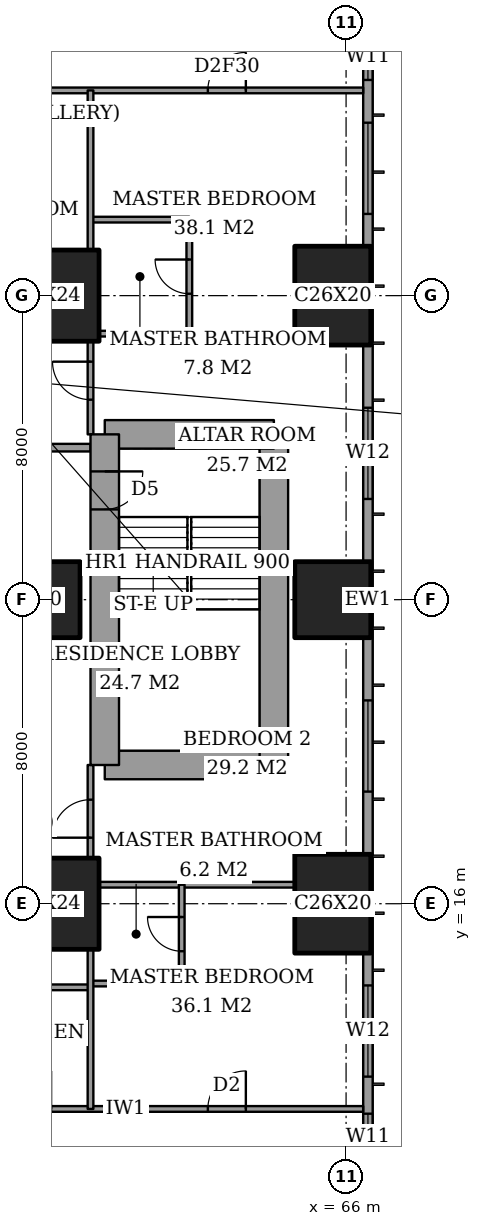
"""IFC4 building model, lengths in metres.
Left out: names, types, materials, properties, quantities, classifications, styles, units other than length and angle.
Written with IfcOpenShell. Run it as: python <this file> out.ifc"""

import sys

from ifc_helpers import new_model, si_unit, direction, frame, frame_2d, origin, origin_2d, place, context, subcontext, project, spatial, rectangle, extrude, element, fill, save


model = new_model("IFC4")
c1 = context("Model", 3, precision=1e-05, world=origin(), true_north=direction((0.0, 1.0)))
c2 = subcontext(c1, "Body", "Model", "MODEL_VIEW")
j1 = project(units=[si_unit("LENGTHUNIT", "METRE"), si_unit("PLANEANGLEUNIT", "RADIAN")], contexts=[c1])
p1 = place(None, origin())
s1 = spatial("IfcSite", under=j1, at=p1, CompositionType="ELEMENT")
p2 = place(p1, origin())
s2 = spatial("IfcBuilding", under=s1, at=p2, CompositionType="ELEMENT")
p3 = place(p2, frame((0.0, 0.0, 103.4)))
s3 = spatial("IfcBuildingStorey", under=s2, at=p3, CompositionType="ELEMENT", Elevation=103.4)
p4 = place(p3, frame((58.0, 16.0, 0.0), z_axis=(0.0, 0.0, 1.0), x_axis=(1.0, 0.0, 0.0)))
e1 = element("IfcColumn", 1, at=p4, inside=s3, PredefinedType="COLUMN", context=c2, shape_type="SweptSolid", body=[
    extrude(rectangle(XDim=3.0, YDim=2.4, at=origin_2d()), origin(), (0.0, 0.0, 1.0), 3.6),
])
p5 = place(p3, frame((58.0, 24.0, 0.0), z_axis=(0.0, 0.0, 1.0), x_axis=(1.0, 0.0, 0.0)))
e2 = element("IfcColumn", 2, at=p5, inside=s3, PredefinedType="COLUMN", context=c2, shape_type="SweptSolid", body=[
    extrude(rectangle(XDim=2.0, YDim=2.0, at=origin_2d()), origin(), (0.0, 0.0, 1.0), 3.6),
])
p6 = place(p3, frame((58.0, 32.0, 0.0), z_axis=(0.0, 0.0, 1.0), x_axis=(1.0, 0.0, 0.0)))
e3 = element("IfcColumn", 3, at=p6, inside=s3, PredefinedType="COLUMN", context=c2, shape_type="SweptSolid", body=[
    extrude(rectangle(XDim=3.0, YDim=2.4, at=origin_2d()), origin(), (0.0, 0.0, 1.0), 3.6),
])
p7 = place(p3, frame((65.65, 16.0, 0.0), z_axis=(0.0, 0.0, 1.0), x_axis=(0.0, 1.0, 0.0)))
e4 = element("IfcColumn", 4, at=p7, inside=s3, PredefinedType="COLUMN", context=c2, shape_type="SweptSolid", body=[
    extrude(rectangle(XDim=2.6, YDim=2.0, at=origin_2d()), origin(), (0.0, 0.0, 1.0), 3.6),
])
p8 = place(p3, frame((65.65, 24.0, 0.0), z_axis=(0.0, 0.0, 1.0), x_axis=(1.0, 0.0, 0.0)))
e5 = element("IfcColumn", 5, at=p8, inside=s3, PredefinedType="COLUMN", context=c2, shape_type="SweptSolid", body=[
    extrude(rectangle(XDim=2.0, YDim=2.0, at=origin_2d()), origin(), (0.0, 0.0, 1.0), 3.6),
])
p9 = place(p3, frame((65.65, 32.0, 0.0), z_axis=(0.0, 0.0, 1.0), x_axis=(0.0, 1.0, 0.0)))
e6 = element("IfcColumn", 6, at=p9, inside=s3, PredefinedType="COLUMN", context=c2, shape_type="SweptSolid", body=[
    extrude(rectangle(XDim=2.6, YDim=2.0, at=origin_2d()), origin(), (0.0, 0.0, 1.0), 3.6),
])
p10 = place(p3, frame((59.65, 19.65, 0.0), z_axis=(0.0, 0.0, 1.0), x_axis=(1.0, 0.0, 0.0)))
e7 = element("IfcWall", 7, at=p10, inside=s3, PredefinedType="SHEAR", context=c2, shape_type="SweptSolid", body=[
    extrude(rectangle(XDim=4.45, YDim=0.75, at=frame_2d((2.225, 0.0))), origin(), (0.0, 0.0, 1.0), 3.6),
])
p11 = place(p3, frame((64.1, 19.65, 0.0), z_axis=(0.0, 0.0, 1.0), x_axis=(0.0, 1.0, 0.0)))
e8 = element("IfcWall", 8, at=p11, inside=s3, PredefinedType="SHEAR", context=c2, shape_type="SweptSolid", body=[
    extrude(rectangle(XDim=8.7, YDim=0.75, at=frame_2d((4.35, 0.0))), origin(), (0.0, 0.0, 1.0), 3.6),
])
p12 = place(p3, frame((64.1, 28.35, 0.0), z_axis=(0.0, 0.0, 1.0), x_axis=(-1.0, 0.0, 0.0)))
e9 = element("IfcWall", 9, at=p12, inside=s3, PredefinedType="SHEAR", context=c2, shape_type="SweptSolid", body=[
    extrude(rectangle(XDim=4.45, YDim=0.75, at=frame_2d((2.225, 0.0))), origin(), (0.0, 0.0, 1.0), 3.6),
])
p13 = place(p3, frame((59.65, 28.35, 0.0), z_axis=(0.0, 0.0, 1.0), x_axis=(0.0, -1.0, 0.0)))
e10 = element("IfcWall", 10, at=p13, inside=s3, PredefinedType="SHEAR", context=c2, shape_type="SweptSolid", body=[
    extrude(rectangle(XDim=8.7, YDim=0.75, at=frame_2d((4.35, 0.0))), origin(), (0.0, 0.0, 1.0), 3.6),
])
p14 = place(p13, frame((0.975, 0.0, 0.0)))
e11 = element("IfcOpeningElement", 11, at=p14, cuts=e10, PredefinedType="OPENING", context=c2, shape_type="SweptSolid", body=[
    extrude(rectangle(XDim=1.0, YDim=2.1, at=frame_2d((0.5, 1.05))), frame((0.0, 0.385, 0.0), z_axis=(0.0, -1.0, 0.0), x_axis=(1.0, 0.0, 0.0)), (0.0, 0.0, 1.0), 0.77),
])
p15 = place(p3, frame((66.575, 3.175, 0.0), z_axis=(0.0, 0.0, 1.0), x_axis=(0.0, 1.0, 0.0)))
e12 = element("IfcWall", 12, at=p15, inside=s3, PredefinedType="SOLIDWALL", context=c2, shape_type="SweptSolid", body=[
    extrude(rectangle(XDim=41.65, YDim=0.25, at=frame_2d((20.825, 0.0))), origin(), (0.0, 0.0, 1.0), 3.6),
])
p16 = place(p15, frame((0.775, 0.0, 0.4)))
e13 = element("IfcOpeningElement", 13, at=p16, cuts=e12, PredefinedType="OPENING", context=c2, shape_type="SweptSolid", body=[
    extrude(rectangle(XDim=2.4, YDim=2.2, at=frame_2d((1.2, 1.1))), frame((0.0, 0.135, 0.0), z_axis=(0.0, -1.0, 0.0), x_axis=(1.0, 0.0, 0.0)), (0.0, 0.0, 1.0), 0.27),
])
p17 = place(p15, frame((6.1, 0.0, 0.4)))
e14 = element("IfcOpeningElement", 14, at=p17, cuts=e12, PredefinedType="OPENING", context=c2, shape_type="SweptSolid", body=[
    extrude(rectangle(XDim=1.2, YDim=2.2, at=frame_2d((0.6, 1.1))), frame((0.0, 0.135, 0.0), z_axis=(0.0, -1.0, 0.0), x_axis=(1.0, 0.0, 0.0)), (0.0, 0.0, 1.0), 0.27),
])
p18 = place(p15, frame((8.275, 0.0, 0.4)))
e15 = element("IfcOpeningElement", 15, at=p18, cuts=e12, PredefinedType="OPENING", context=c2, shape_type="SweptSolid", body=[
    extrude(rectangle(XDim=2.4, YDim=2.2, at=frame_2d((1.2, 1.1))), frame((0.0, 0.135, 0.0), z_axis=(0.0, -1.0, 0.0), x_axis=(1.0, 0.0, 0.0)), (0.0, 0.0, 1.0), 0.27),
])
p19 = place(p15, frame((15.775, 0.0, 0.4)))
e16 = element("IfcOpeningElement", 16, at=p19, cuts=e12, PredefinedType="OPENING", context=c2, shape_type="SweptSolid", body=[
    extrude(rectangle(XDim=2.4, YDim=2.2, at=frame_2d((1.2, 1.1))), frame((0.0, 0.135, 0.0), z_axis=(0.0, -1.0, 0.0), x_axis=(1.0, 0.0, 0.0)), (0.0, 0.0, 1.0), 0.27),
])
p20 = place(p15, frame((23.475, 0.0, 0.4)))
e17 = element("IfcOpeningElement", 17, at=p20, cuts=e12, PredefinedType="OPENING", context=c2, shape_type="SweptSolid", body=[
    extrude(rectangle(XDim=2.4, YDim=2.2, at=frame_2d((1.2, 1.1))), frame((0.0, 0.135, 0.0), z_axis=(0.0, -1.0, 0.0), x_axis=(1.0, 0.0, 0.0)), (0.0, 0.0, 1.0), 0.27),
])
p21 = place(p15, frame((30.975, 0.0, 0.4)))
e18 = element("IfcOpeningElement", 18, at=p21, cuts=e12, PredefinedType="OPENING", context=c2, shape_type="SweptSolid", body=[
    extrude(rectangle(XDim=2.4, YDim=2.2, at=frame_2d((1.2, 1.1))), frame((0.0, 0.135, 0.0), z_axis=(0.0, -1.0, 0.0), x_axis=(1.0, 0.0, 0.0)), (0.0, 0.0, 1.0), 0.27),
])
p22 = place(p15, frame((34.5, 0.0, 0.4)))
e19 = element("IfcOpeningElement", 19, at=p22, cuts=e12, PredefinedType="OPENING", context=c2, shape_type="SweptSolid", body=[
    extrude(rectangle(XDim=1.2, YDim=2.2, at=frame_2d((0.6, 1.1))), frame((0.0, 0.135, 0.0), z_axis=(0.0, -1.0, 0.0), x_axis=(1.0, 0.0, 0.0)), (0.0, 0.0, 1.0), 0.27),
])
p23 = place(p15, frame((38.475, 0.0, 0.4)))
e20 = element("IfcOpeningElement", 20, at=p23, cuts=e12, PredefinedType="OPENING", context=c2, shape_type="SweptSolid", body=[
    extrude(rectangle(XDim=2.4, YDim=2.2, at=frame_2d((1.2, 1.1))), frame((0.0, 0.135, 0.0), z_axis=(0.0, -1.0, 0.0), x_axis=(1.0, 0.0, 0.0)), (0.0, 0.0, 1.0), 0.27),
])
p24 = place(p3, frame((41.439, 10.6, 0.0), z_axis=(0.0, 0.0, 1.0), x_axis=(1.0, 0.0, 0.0)))
e21 = element("IfcWall", 21, at=p24, inside=s3, PredefinedType="PARTITIONING", context=c2, shape_type="SweptSolid", body=[
    extrude(rectangle(XDim=25.011, YDim=0.15, at=frame_2d((12.505, 0.0))), origin(), (0.0, 0.0, 1.0), 3.35),
])
p25 = place(p24, frame((10.761, 0.0, 0.0)))
e22 = element("IfcOpeningElement", 22, at=p25, cuts=e21, PredefinedType="OPENING", context=c2, shape_type="SweptSolid", body=[
    extrude(rectangle(XDim=1.0, YDim=2.1, at=frame_2d((0.5, 1.05))), frame((0.0, 0.085, 0.0), z_axis=(0.0, -1.0, 0.0), x_axis=(1.0, 0.0, 0.0)), (0.0, 0.0, 1.0), 0.17),
])
p26 = place(p24, frame((20.924, 0.0, 0.0)))
e23 = element("IfcOpeningElement", 23, at=p26, cuts=e21, PredefinedType="OPENING", context=c2, shape_type="SweptSolid", body=[
    extrude(rectangle(XDim=1.0, YDim=2.1, at=frame_2d((0.5, 1.05))), frame((0.0, 0.085, 0.0), z_axis=(0.0, -1.0, 0.0), x_axis=(1.0, 0.0, 0.0)), (0.0, 0.0, 1.0), 0.17),
])
p27 = place(p24, frame((15.799, 0.0, 0.0)))
e24 = element("IfcOpeningElement", 24, at=p27, cuts=e21, PredefinedType="OPENING", context=c2, shape_type="SweptSolid", body=[
    extrude(rectangle(XDim=1.0, YDim=2.1, at=frame_2d((0.5, 1.05))), frame((0.0, 0.085, 0.0), z_axis=(0.0, -1.0, 0.0), x_axis=(1.0, 0.0, 0.0)), (0.0, 0.0, 1.0), 0.17),
])
p28 = place(p24, frame((13.061, 0.0, 0.0)))
e25 = element("IfcOpeningElement", 25, at=p28, cuts=e21, PredefinedType="OPENING", context=c2, shape_type="SweptSolid", body=[
    extrude(rectangle(XDim=1.0, YDim=2.1, at=frame_2d((0.5, 1.05))), frame((0.0, 0.085, 0.0), z_axis=(0.0, -1.0, 0.0), x_axis=(1.0, 0.0, 0.0)), (0.0, 0.0, 1.0), 0.17),
])
p29 = place(p24, frame((7.911, 0.0, 0.0)))
e26 = element("IfcOpeningElement", 26, at=p29, cuts=e21, PredefinedType="OPENING", context=c2, shape_type="SweptSolid", body=[
    extrude(rectangle(XDim=0.9, YDim=2.1, at=frame_2d((0.45, 1.05))), frame((0.0, 0.085, 0.0), z_axis=(0.0, -1.0, 0.0), x_axis=(1.0, 0.0, 0.0)), (0.0, 0.0, 1.0), 0.17),
])
p30 = place(p24, frame((2.836, 0.0, 0.0)))
e27 = element("IfcOpeningElement", 27, at=p30, cuts=e21, PredefinedType="OPENING", context=c2, shape_type="SweptSolid", body=[
    extrude(rectangle(XDim=1.0, YDim=2.1, at=frame_2d((0.5, 1.05))), frame((0.0, 0.085, 0.0), z_axis=(0.0, -1.0, 0.0), x_axis=(1.0, 0.0, 0.0)), (0.0, 0.0, 1.0), 0.17),
])
p31 = place(p3, frame((56.2, 13.8, 0.0), z_axis=(0.0, 0.0, 1.0), x_axis=(1.0, 0.0, 0.0)))
e28 = element("IfcWall", 28, at=p31, inside=s3, PredefinedType="PARTITIONING", context=c2, shape_type="SweptSolid", body=[
    extrude(rectangle(XDim=3.075, YDim=0.15, at=frame_2d((1.538, 0.0))), origin(), (0.0, 0.0, 1.0), 3.35),
])
p32 = place(p3, frame((59.275, 13.9, 0.0), z_axis=(0.0, 0.0, 1.0), x_axis=(1.0, 0.0, 0.0)))
e29 = element("IfcWall", 29, at=p32, inside=s3, PredefinedType="PARTITIONING", context=c2, shape_type="SweptSolid", body=[
    extrude(rectangle(XDim=2.4, YDim=0.15, at=frame_2d((1.2, 0.0))), origin(), (0.0, 0.0, 1.0), 3.35),
])
p33 = place(p3, frame((59.5, 16.5, 0.0), z_axis=(0.0, 0.0, 1.0), x_axis=(1.0, 0.0, 0.0)))
e30 = element("IfcWall", 30, at=p33, inside=s3, PredefinedType="PARTITIONING", context=c2, shape_type="SweptSolid", body=[
    extrude(rectangle(XDim=5.15, YDim=0.15, at=frame_2d((2.575, 0.0))), origin(), (0.0, 0.0, 1.0), 3.35),
])
p34 = place(p3, frame((42.0, 28.0, 0.0), z_axis=(0.0, 0.0, 1.0), x_axis=(1.0, 0.0, 0.0)))
e31 = element("IfcWall", 31, at=p34, inside=s3, PredefinedType="PARTITIONING", context=c2, shape_type="SweptSolid", body=[
    extrude(rectangle(XDim=17.275, YDim=0.2, at=frame_2d((8.637, 0.0))), origin(), (0.0, 0.0, 1.0), 3.35),
])
p35 = place(p34, frame((8.9, 0.0, 0.0)))
e32 = element("IfcOpeningElement", 32, at=p35, cuts=e31, PredefinedType="OPENING", context=c2, shape_type="SweptSolid", body=[
    extrude(rectangle(XDim=1.2, YDim=2.4, at=frame_2d((0.6, 1.2))), frame((0.0, 0.11, 0.0), z_axis=(0.0, -1.0, 0.0), x_axis=(1.0, 0.0, 0.0)), (0.0, 0.0, 1.0), 0.22),
])
p36 = place(p3, frame((59.5, 31.0, 0.0), z_axis=(0.0, 0.0, 1.0), x_axis=(1.0, 0.0, 0.0)))
e33 = element("IfcWall", 33, at=p36, inside=s3, PredefinedType="PARTITIONING", context=c2, shape_type="SweptSolid", body=[
    extrude(rectangle(XDim=5.15, YDim=0.15, at=frame_2d((2.575, 0.0))), origin(), (0.0, 0.0, 1.0), 3.35),
])
p37 = place(p3, frame((59.275, 34.0, 0.0), z_axis=(0.0, 0.0, 1.0), x_axis=(1.0, 0.0, 0.0)))
e34 = element("IfcWall", 34, at=p37, inside=s3, PredefinedType="PARTITIONING", context=c2, shape_type="SweptSolid", body=[
    extrude(rectangle(XDim=2.6, YDim=0.15, at=frame_2d((1.3, 0.0))), origin(), (0.0, 0.0, 1.0), 3.35),
])
p38 = place(p3, frame((41.439, 37.4, 0.0), z_axis=(0.0, 0.0, 1.0), x_axis=(1.0, 0.0, 0.0)))
e35 = element("IfcWall", 35, at=p38, inside=s3, PredefinedType="PARTITIONING", context=c2, shape_type="SweptSolid", body=[
    extrude(rectangle(XDim=25.011, YDim=0.15, at=frame_2d((12.505, 0.0))), origin(), (0.0, 0.0, 1.0), 3.35),
])
p39 = place(p38, frame((11.961, 0.0, 0.0)))
e36 = element("IfcOpeningElement", 36, at=p39, cuts=e35, PredefinedType="OPENING", context=c2, shape_type="SweptSolid", body=[
    extrude(rectangle(XDim=1.0, YDim=2.1, at=frame_2d((0.5, 1.05))), frame((0.0, 0.085, 0.0), z_axis=(0.0, -1.0, 0.0), x_axis=(1.0, 0.0, 0.0)), (0.0, 0.0, 1.0), 0.17),
])
p40 = place(p38, frame((20.924, 0.0, 0.0)))
e37 = element("IfcOpeningElement", 37, at=p40, cuts=e35, PredefinedType="OPENING", context=c2, shape_type="SweptSolid", body=[
    extrude(rectangle(XDim=1.0, YDim=2.1, at=frame_2d((0.5, 1.05))), frame((0.0, 0.085, 0.0), z_axis=(0.0, -1.0, 0.0), x_axis=(1.0, 0.0, 0.0)), (0.0, 0.0, 1.0), 0.17),
])
p41 = place(p38, frame((15.249, 0.0, 0.0)))
e38 = element("IfcOpeningElement", 38, at=p41, cuts=e35, PredefinedType="OPENING", context=c2, shape_type="SweptSolid", body=[
    extrude(rectangle(XDim=0.9, YDim=2.1, at=frame_2d((0.45, 1.05))), frame((0.0, 0.085, 0.0), z_axis=(0.0, -1.0, 0.0), x_axis=(1.0, 0.0, 0.0)), (0.0, 0.0, 1.0), 0.17),
])
p42 = place(p38, frame((9.561, 0.0, 0.0)))
e39 = element("IfcOpeningElement", 39, at=p42, cuts=e35, PredefinedType="OPENING", context=c2, shape_type="SweptSolid", body=[
    extrude(rectangle(XDim=1.0, YDim=2.1, at=frame_2d((0.5, 1.05))), frame((0.0, 0.085, 0.0), z_axis=(0.0, -1.0, 0.0), x_axis=(1.0, 0.0, 0.0)), (0.0, 0.0, 1.0), 0.17),
])
p43 = place(p38, frame((7.161, 0.0, 0.0)))
e40 = element("IfcOpeningElement", 40, at=p43, cuts=e35, PredefinedType="OPENING", context=c2, shape_type="SweptSolid", body=[
    extrude(rectangle(XDim=1.0, YDim=2.1, at=frame_2d((0.5, 1.05))), frame((0.0, 0.085, 0.0), z_axis=(0.0, -1.0, 0.0), x_axis=(1.0, 0.0, 0.0)), (0.0, 0.0, 1.0), 0.17),
])
p44 = place(p38, frame((2.836, 0.0, 0.0)))
e41 = element("IfcOpeningElement", 41, at=p44, cuts=e35, PredefinedType="OPENING", context=c2, shape_type="SweptSolid", body=[
    extrude(rectangle(XDim=1.0, YDim=2.1, at=frame_2d((0.5, 1.05))), frame((0.0, 0.085, 0.0), z_axis=(0.0, -1.0, 0.0), x_axis=(1.0, 0.0, 0.0)), (0.0, 0.0, 1.0), 0.17),
])
p45 = place(p3, frame((59.275, 10.6, 0.0), z_axis=(0.0, 0.0, 1.0), x_axis=(0.0, 1.0, 0.0)))
e42 = element("IfcWall", 42, at=p45, inside=s3, PredefinedType="PARTITIONING", context=c2, shape_type="SweptSolid", body=[
    extrude(rectangle(XDim=4.2, YDim=0.15, at=frame_2d((2.1, 0.0))), origin(), (0.0, 0.0, 1.0), 3.35),
])
p46 = place(p3, frame((59.275, 17.2, 0.0), z_axis=(0.0, 0.0, 1.0), x_axis=(0.0, 1.0, 0.0)))
e43 = element("IfcWall", 43, at=p46, inside=s3, PredefinedType="PARTITIONING", context=c2, shape_type="SweptSolid", body=[
    extrude(rectangle(XDim=2.45, YDim=0.15, at=frame_2d((1.225, 0.0))), origin(), (0.0, 0.0, 1.0), 3.35),
])
p47 = place(p46, frame((0.538, 0.0, 0.0)))
e44 = element("IfcOpeningElement", 44, at=p47, cuts=e43, PredefinedType="OPENING", context=c2, shape_type="SweptSolid", body=[
    extrude(rectangle(XDim=1.0, YDim=2.1, at=frame_2d((0.5, 1.05))), frame((0.0, 0.085, 0.0), z_axis=(0.0, -1.0, 0.0), x_axis=(1.0, 0.0, 0.0)), (0.0, 0.0, 1.0), 0.17),
])
p48 = place(p3, frame((59.275, 28.35, 0.0), z_axis=(0.0, 0.0, 1.0), x_axis=(0.0, 1.0, 0.0)))
e45 = element("IfcWall", 45, at=p48, inside=s3, PredefinedType="PARTITIONING", context=c2, shape_type="SweptSolid", body=[
    extrude(rectangle(XDim=2.45, YDim=0.15, at=frame_2d((1.225, 0.0))), origin(), (0.0, 0.0, 1.0), 3.35),
])
p49 = place(p48, frame((0.913, 0.0, 0.0)))
e46 = element("IfcOpeningElement", 46, at=p49, cuts=e45, PredefinedType="OPENING", context=c2, shape_type="SweptSolid", body=[
    extrude(rectangle(XDim=1.0, YDim=2.1, at=frame_2d((0.5, 1.05))), frame((0.0, 0.085, 0.0), z_axis=(0.0, -1.0, 0.0), x_axis=(1.0, 0.0, 0.0)), (0.0, 0.0, 1.0), 0.17),
])
p50 = place(p3, frame((59.275, 33.2, 0.0), z_axis=(0.0, 0.0, 1.0), x_axis=(0.0, 1.0, 0.0)))
e47 = element("IfcWall", 47, at=p50, inside=s3, PredefinedType="PARTITIONING", context=c2, shape_type="SweptSolid", body=[
    extrude(rectangle(XDim=4.2, YDim=0.15, at=frame_2d((2.1, 0.0))), origin(), (0.0, 0.0, 1.0), 3.35),
])
p51 = place(p3, frame((61.675, 13.9, 0.0), z_axis=(0.0, 0.0, 1.0), x_axis=(0.0, 1.0, 0.0)))
e48 = element("IfcWall", 48, at=p51, inside=s3, PredefinedType="PARTITIONING", context=c2, shape_type="SweptSolid", body=[
    extrude(rectangle(XDim=2.6, YDim=0.15, at=frame_2d((1.3, 0.0))), origin(), (0.0, 0.0, 1.0), 3.35),
])
p52 = place(p51, frame((0.85, 0.0, 0.0)))
e49 = element("IfcOpeningElement", 49, at=p52, cuts=e48, PredefinedType="OPENING", context=c2, shape_type="SweptSolid", body=[
    extrude(rectangle(XDim=0.9, YDim=2.1, at=frame_2d((0.45, 1.05))), frame((0.0, 0.085, 0.0), z_axis=(0.0, -1.0, 0.0), x_axis=(1.0, 0.0, 0.0)), (0.0, 0.0, 1.0), 0.17),
])
p53 = place(p3, frame((61.875, 31.0, 0.0), z_axis=(0.0, 0.0, 1.0), x_axis=(0.0, 1.0, 0.0)))
e50 = element("IfcWall", 50, at=p53, inside=s3, PredefinedType="PARTITIONING", context=c2, shape_type="SweptSolid", body=[
    extrude(rectangle(XDim=3.0, YDim=0.15, at=frame_2d((1.5, 0.0))), origin(), (0.0, 0.0, 1.0), 3.35),
])
p54 = place(p53, frame((1.05, 0.0, 0.0)))
e51 = element("IfcOpeningElement", 51, at=p54, cuts=e50, PredefinedType="OPENING", context=c2, shape_type="SweptSolid", body=[
    extrude(rectangle(XDim=0.9, YDim=2.1, at=frame_2d((0.45, 1.05))), frame((0.0, 0.085, 0.0), z_axis=(0.0, -1.0, 0.0), x_axis=(1.0, 0.0, 0.0)), (0.0, 0.0, 1.0), 0.17),
])
p55 = place(p17, origin())
e52 = element("IfcWindow", 52, at=p55, inside=s3, PartitioningType="SINGLE_PANEL", PredefinedType="WINDOW", context=c2, shape_type="SweptSolid", body=[
    extrude(rectangle(XDim=1.2, YDim=2.2, at=frame_2d((0.6, 1.1))), frame((0.0, 0.03, 0.0), z_axis=(0.0, -1.0, 0.0), x_axis=(1.0, 0.0, 0.0)), (0.0, 0.0, 1.0), 0.06),
])
fill(e14, e52)
p56 = place(p18, origin())
e53 = element("IfcWindow", 53, at=p56, inside=s3, PartitioningType="SINGLE_PANEL", PredefinedType="WINDOW", context=c2, shape_type="SweptSolid", body=[
    extrude(rectangle(XDim=2.4, YDim=2.2, at=frame_2d((1.2, 1.1))), frame((0.0, 0.03, 0.0), z_axis=(0.0, -1.0, 0.0), x_axis=(1.0, 0.0, 0.0)), (0.0, 0.0, 1.0), 0.06),
])
fill(e15, e53)
p57 = place(p19, origin())
e54 = element("IfcWindow", 54, at=p57, inside=s3, PartitioningType="SINGLE_PANEL", PredefinedType="WINDOW", context=c2, shape_type="SweptSolid", body=[
    extrude(rectangle(XDim=2.4, YDim=2.2, at=frame_2d((1.2, 1.1))), frame((0.0, 0.03, 0.0), z_axis=(0.0, -1.0, 0.0), x_axis=(1.0, 0.0, 0.0)), (0.0, 0.0, 1.0), 0.06),
])
fill(e16, e54)
p58 = place(p20, origin())
e55 = element("IfcWindow", 55, at=p58, inside=s3, PartitioningType="SINGLE_PANEL", PredefinedType="WINDOW", context=c2, shape_type="SweptSolid", body=[
    extrude(rectangle(XDim=2.4, YDim=2.2, at=frame_2d((1.2, 1.1))), frame((0.0, 0.03, 0.0), z_axis=(0.0, -1.0, 0.0), x_axis=(1.0, 0.0, 0.0)), (0.0, 0.0, 1.0), 0.06),
])
fill(e17, e55)
p59 = place(p21, origin())
e56 = element("IfcWindow", 56, at=p59, inside=s3, PartitioningType="SINGLE_PANEL", PredefinedType="WINDOW", context=c2, shape_type="SweptSolid", body=[
    extrude(rectangle(XDim=2.4, YDim=2.2, at=frame_2d((1.2, 1.1))), frame((0.0, 0.03, 0.0), z_axis=(0.0, -1.0, 0.0), x_axis=(1.0, 0.0, 0.0)), (0.0, 0.0, 1.0), 0.06),
])
fill(e18, e56)
p60 = place(p22, origin())
e57 = element("IfcWindow", 57, at=p60, inside=s3, PartitioningType="SINGLE_PANEL", PredefinedType="WINDOW", context=c2, shape_type="SweptSolid", body=[
    extrude(rectangle(XDim=1.2, YDim=2.2, at=frame_2d((0.6, 1.1))), frame((0.0, 0.03, 0.0), z_axis=(0.0, -1.0, 0.0), x_axis=(1.0, 0.0, 0.0)), (0.0, 0.0, 1.0), 0.06),
])
fill(e19, e57)
p61 = place(p52, origin())
e58 = element("IfcDoor", 58, at=p61, inside=s3, OperationType="SINGLE_SWING_LEFT", PredefinedType="DOOR", context=c2, shape_type="SweptSolid", body=[
    extrude(rectangle(XDim=0.9, YDim=2.1, at=frame_2d((0.45, 1.05))), frame((0.0, 0.025, 0.0), z_axis=(0.0, -1.0, 0.0), x_axis=(1.0, 0.0, 0.0)), (0.0, 0.0, 1.0), 0.05),
])
fill(e49, e58)
p62 = place(p26, origin())
e59 = element("IfcDoor", 59, at=p62, inside=s3, OperationType="SINGLE_SWING_LEFT", PredefinedType="DOOR", context=c2, shape_type="SweptSolid", body=[
    extrude(rectangle(XDim=1.0, YDim=2.1, at=frame_2d((0.5, 1.05))), frame((0.0, 0.025, 0.0), z_axis=(0.0, -1.0, 0.0), x_axis=(1.0, 0.0, 0.0)), (0.0, 0.0, 1.0), 0.05),
])
fill(e23, e59)
p63 = place(p47, origin())
e60 = element("IfcDoor", 60, at=p63, inside=s3, OperationType="SINGLE_SWING_RIGHT", PredefinedType="DOOR", context=c2, shape_type="SweptSolid", body=[
    extrude(rectangle(XDim=1.0, YDim=2.1, at=frame_2d((0.5, 1.05))), frame((0.0, 0.025, 0.0), z_axis=(0.0, -1.0, 0.0), x_axis=(1.0, 0.0, 0.0)), (0.0, 0.0, 1.0), 0.05),
])
fill(e44, e60)
p64 = place(p54, origin())
e61 = element("IfcDoor", 61, at=p64, inside=s3, OperationType="SINGLE_SWING_LEFT", PredefinedType="DOOR", context=c2, shape_type="SweptSolid", body=[
    extrude(rectangle(XDim=0.9, YDim=2.1, at=frame_2d((0.45, 1.05))), frame((0.0, 0.025, 0.0), z_axis=(0.0, -1.0, 0.0), x_axis=(1.0, 0.0, 0.0)), (0.0, 0.0, 1.0), 0.05),
])
fill(e51, e61)
p65 = place(p40, origin())
e62 = element("IfcDoor", 62, at=p65, inside=s3, OperationType="SINGLE_SWING_LEFT", PredefinedType="DOOR", context=c2, shape_type="SweptSolid", body=[
    extrude(rectangle(XDim=1.0, YDim=2.1, at=frame_2d((0.5, 1.05))), frame((0.0, 0.025, 0.0), z_axis=(0.0, -1.0, 0.0), x_axis=(1.0, 0.0, 0.0)), (0.0, 0.0, 1.0), 0.05),
])
fill(e37, e62)
p66 = place(p49, origin())
e63 = element("IfcDoor", 63, at=p66, inside=s3, OperationType="SINGLE_SWING_LEFT", PredefinedType="DOOR", context=c2, shape_type="SweptSolid", body=[
    extrude(rectangle(XDim=1.0, YDim=2.1, at=frame_2d((0.5, 1.05))), frame((0.0, 0.025, 0.0), z_axis=(0.0, -1.0, 0.0), x_axis=(1.0, 0.0, 0.0)), (0.0, 0.0, 1.0), 0.05),
])
fill(e46, e63)
p67 = place(p14, origin())
e64 = element("IfcDoor", 64, at=p67, inside=s3, OperationType="SINGLE_SWING_RIGHT", PredefinedType="DOOR", context=c2, shape_type="SweptSolid", body=[
    extrude(rectangle(XDim=1.0, YDim=2.1, at=frame_2d((0.5, 1.05))), frame((0.0, 0.025, 0.0), z_axis=(0.0, -1.0, 0.0), x_axis=(1.0, 0.0, 0.0)), (0.0, 0.0, 1.0), 0.05),
])
fill(e11, e64)
save(model, sys.argv[1])
